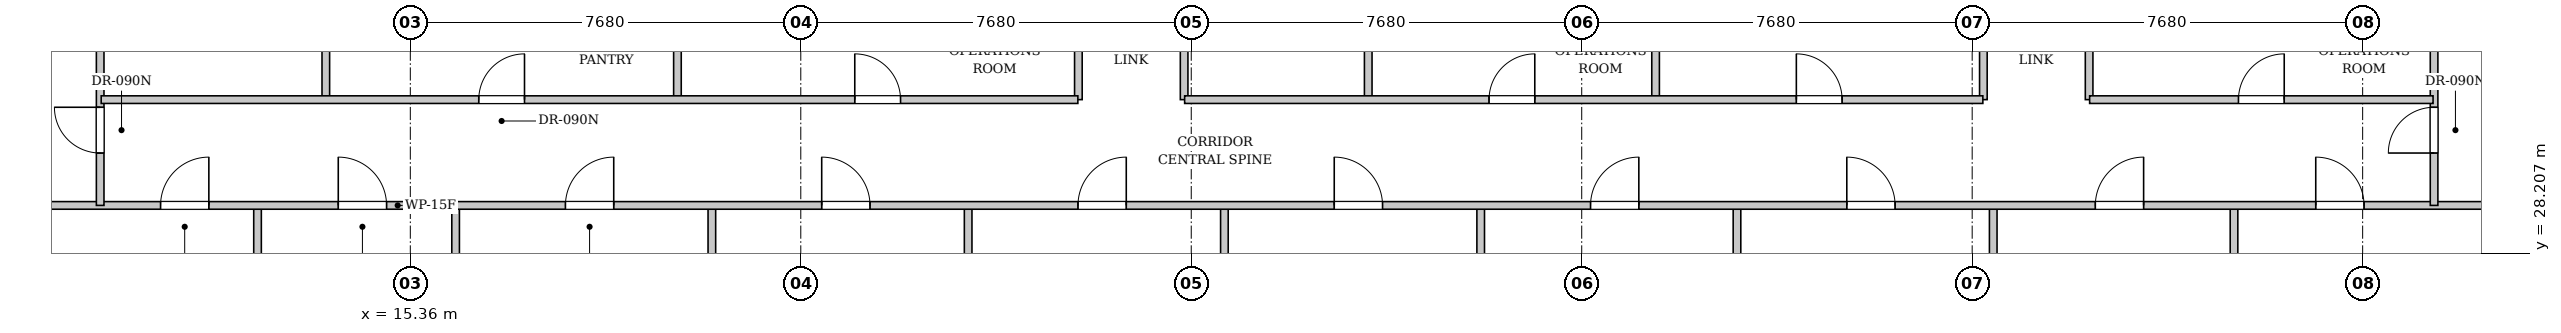
"""IFC4 building model, lengths in metres.
Left out: names, types, materials, properties, quantities, classifications, styles, units other than length and angle.
Written with IfcOpenShell. Run it as: python <this file> out.ifc"""

import sys

from ifc_helpers import new_model, si_unit, direction, frame, frame_2d, origin, place, context, subcontext, project, spatial, rectangle, extrude, element, fill, save


model = new_model("IFC4")
c1 = context("Model", 3, precision=1e-05, world=origin(), true_north=direction((0.0, 1.0)))
c2 = subcontext(c1, "Body", "Model", "MODEL_VIEW")
j1 = project(units=[si_unit("LENGTHUNIT", "METRE"), si_unit("PLANEANGLEUNIT", "RADIAN")], contexts=[c1])
p1 = place(None, origin())
s1 = spatial("IfcSite", under=j1, at=p1, CompositionType="ELEMENT")
p2 = place(p1, origin())
s2 = spatial("IfcBuilding", under=s1, at=p2, CompositionType="ELEMENT")
p3 = place(p2, frame((0.0, 0.0, 178.7)))
s3 = spatial("IfcBuildingStorey", under=s2, at=p3, CompositionType="ELEMENT", Elevation=178.7)
p4 = place(p3, frame((12.355, 12.972, 0.0), z_axis=(0.0, 0.0, 1.0), x_axis=(0.0, 1.0, 0.0)))
e1 = element("IfcWall", 1, at=p4, inside=s3, PredefinedType="PARTITIONING", context=c2, shape_type="SweptSolid", body=[
    extrude(rectangle(XDim=16.198, YDim=0.15, at=frame_2d((8.099, 0.0))), origin(), (0.0, 0.0, 1.0), 3.08),
])
p5 = place(p3, frame((16.251, 12.597, 0.0), z_axis=(0.0, 0.0, 1.0), x_axis=(0.0, 1.0, 0.0)))
e2 = element("IfcWall", 2, at=p5, inside=s3, PredefinedType="PARTITIONING", context=c2, shape_type="SweptSolid", body=[
    extrude(rectangle(XDim=16.573, YDim=0.15, at=frame_2d((8.286, 0.0))), origin(), (0.0, 0.0, 1.0), 3.08),
])
p6 = place(p3, frame((21.291, 12.112, 0.0), z_axis=(0.0, 0.0, 1.0), x_axis=(0.0, 1.0, 0.0)))
e3 = element("IfcWall", 3, at=p6, inside=s3, PredefinedType="PARTITIONING", context=c2, shape_type="SweptSolid", body=[
    extrude(rectangle(XDim=17.058, YDim=0.15, at=frame_2d((8.529, 0.0))), origin(), (0.0, 0.0, 1.0), 3.08),
])
p7 = place(p3, frame((26.332, 11.626, 0.0), z_axis=(0.0, 0.0, 1.0), x_axis=(0.0, 1.0, 0.0)))
e4 = element("IfcWall", 4, at=p7, inside=s3, PredefinedType="PARTITIONING", context=c2, shape_type="SweptSolid", body=[
    extrude(rectangle(XDim=17.543, YDim=0.15, at=frame_2d((8.772, 0.0))), origin(), (0.0, 0.0, 1.0), 3.08),
])
p8 = place(p3, frame((31.372, 11.141, 0.0), z_axis=(0.0, 0.0, 1.0), x_axis=(0.0, 1.0, 0.0)))
e5 = element("IfcWall", 5, at=p8, inside=s3, PredefinedType="PARTITIONING", context=c2, shape_type="SweptSolid", body=[
    extrude(rectangle(XDim=18.029, YDim=0.15, at=frame_2d((9.014, 0.0))), origin(), (0.0, 0.0, 1.0), 2.475),
])
p9 = place(p3, frame((36.413, 10.656, 0.0), z_axis=(0.0, 0.0, 1.0), x_axis=(0.0, 1.0, 0.0)))
e6 = element("IfcWall", 6, at=p9, inside=s3, PredefinedType="PARTITIONING", context=c2, shape_type="SweptSolid", body=[
    extrude(rectangle(XDim=18.514, YDim=0.15, at=frame_2d((9.257, 0.0))), origin(), (0.0, 0.0, 1.0), 3.08),
])
p10 = place(p3, frame((41.454, 10.17, 0.0), z_axis=(0.0, 0.0, 1.0), x_axis=(0.0, 1.0, 0.0)))
e7 = element("IfcWall", 7, at=p10, inside=s3, PredefinedType="PARTITIONING", context=c2, shape_type="SweptSolid", body=[
    extrude(rectangle(XDim=19.0, YDim=0.15, at=frame_2d((9.5, 0.0))), origin(), (0.0, 0.0, 1.0), 3.08),
])
p11 = place(p3, frame((46.494, 9.685, 0.0), z_axis=(0.0, 0.0, 1.0), x_axis=(0.0, 1.0, 0.0)))
e8 = element("IfcWall", 8, at=p11, inside=s3, PredefinedType="PARTITIONING", context=c2, shape_type="SweptSolid", body=[
    extrude(rectangle(XDim=19.485, YDim=0.15, at=frame_2d((9.742, 0.0))), origin(), (0.0, 0.0, 1.0), 2.475),
])
p12 = place(p3, frame((51.23, 9.229, 0.0), z_axis=(0.0, 0.0, 1.0), x_axis=(0.0, 1.0, 0.0)))
e9 = element("IfcWall", 9, at=p12, inside=s3, PredefinedType="PARTITIONING", context=c2, shape_type="SweptSolid", body=[
    extrude(rectangle(XDim=19.941, YDim=0.15, at=frame_2d((9.97, 0.0))), origin(), (0.0, 0.0, 1.0), 3.08),
])
p13 = place(p3, frame((2.46, 29.15, 0.0), z_axis=(0.0, 0.0, 1.0), x_axis=(1.0, 0.0, 0.0)))
e10 = element("IfcWall", 10, at=p13, inside=s3, PredefinedType="PARTITIONING", context=c2, shape_type="SweptSolid", body=[
    extrude(rectangle(XDim=57.505, YDim=0.15, at=frame_2d((28.752, 0.0))), origin(), (0.0, 0.0, 1.0), 2.475),
])
p14 = place(p13, frame((7.987, 0.0, 0.0)))
e11 = element("IfcOpeningElement", 11, at=p14, cuts=e10, PredefinedType="OPENING", context=c2, shape_type="SweptSolid", body=[
    extrude(rectangle(XDim=0.95, YDim=2.15, at=frame_2d((0.475, 1.075))), frame((0.0, 0.085, 0.0), z_axis=(0.0, -1.0, 0.0), x_axis=(1.0, 0.0, 0.0)), (0.0, 0.0, 1.0), 0.17),
])
p15 = place(p13, frame((11.483, 0.0, 0.0)))
e12 = element("IfcOpeningElement", 12, at=p15, cuts=e10, PredefinedType="OPENING", context=c2, shape_type="SweptSolid", body=[
    extrude(rectangle(XDim=0.95, YDim=2.15, at=frame_2d((0.475, 1.075))), frame((0.0, 0.085, 0.0), z_axis=(0.0, -1.0, 0.0), x_axis=(1.0, 0.0, 0.0)), (0.0, 0.0, 1.0), 0.17),
])
p16 = place(p13, frame((15.951, 0.0, 0.0)))
e13 = element("IfcOpeningElement", 13, at=p16, cuts=e10, PredefinedType="OPENING", context=c2, shape_type="SweptSolid", body=[
    extrude(rectangle(XDim=0.95, YDim=2.15, at=frame_2d((0.475, 1.075))), frame((0.0, 0.085, 0.0), z_axis=(0.0, -1.0, 0.0), x_axis=(1.0, 0.0, 0.0)), (0.0, 0.0, 1.0), 0.17),
])
p17 = place(p13, frame((20.991, 0.0, 0.0)))
e14 = element("IfcOpeningElement", 14, at=p17, cuts=e10, PredefinedType="OPENING", context=c2, shape_type="SweptSolid", body=[
    extrude(rectangle(XDim=0.95, YDim=2.15, at=frame_2d((0.475, 1.075))), frame((0.0, 0.085, 0.0), z_axis=(0.0, -1.0, 0.0), x_axis=(1.0, 0.0, 0.0)), (0.0, 0.0, 1.0), 0.17),
])
p18 = place(p13, frame((26.032, 0.0, 0.0)))
e15 = element("IfcOpeningElement", 15, at=p18, cuts=e10, PredefinedType="OPENING", context=c2, shape_type="SweptSolid", body=[
    extrude(rectangle(XDim=0.95, YDim=2.15, at=frame_2d((0.475, 1.075))), frame((0.0, 0.085, 0.0), z_axis=(0.0, -1.0, 0.0), x_axis=(1.0, 0.0, 0.0)), (0.0, 0.0, 1.0), 0.17),
])
p19 = place(p13, frame((31.072, 0.0, 0.0)))
e16 = element("IfcOpeningElement", 16, at=p19, cuts=e10, PredefinedType="OPENING", context=c2, shape_type="SweptSolid", body=[
    extrude(rectangle(XDim=0.95, YDim=2.15, at=frame_2d((0.475, 1.075))), frame((0.0, 0.085, 0.0), z_axis=(0.0, -1.0, 0.0), x_axis=(1.0, 0.0, 0.0)), (0.0, 0.0, 1.0), 0.17),
])
p20 = place(p13, frame((36.113, 0.0, 0.0)))
e17 = element("IfcOpeningElement", 17, at=p20, cuts=e10, PredefinedType="OPENING", context=c2, shape_type="SweptSolid", body=[
    extrude(rectangle(XDim=0.95, YDim=2.15, at=frame_2d((0.475, 1.075))), frame((0.0, 0.085, 0.0), z_axis=(0.0, -1.0, 0.0), x_axis=(1.0, 0.0, 0.0)), (0.0, 0.0, 1.0), 0.17),
])
p21 = place(p13, frame((41.154, 0.0, 0.0)))
e18 = element("IfcOpeningElement", 18, at=p21, cuts=e10, PredefinedType="OPENING", context=c2, shape_type="SweptSolid", body=[
    extrude(rectangle(XDim=0.95, YDim=2.15, at=frame_2d((0.475, 1.075))), frame((0.0, 0.085, 0.0), z_axis=(0.0, -1.0, 0.0), x_axis=(1.0, 0.0, 0.0)), (0.0, 0.0, 1.0), 0.17),
])
p22 = place(p13, frame((46.042, 0.0, 0.0)))
e19 = element("IfcOpeningElement", 19, at=p22, cuts=e10, PredefinedType="OPENING", context=c2, shape_type="SweptSolid", body=[
    extrude(rectangle(XDim=0.95, YDim=2.15, at=frame_2d((0.475, 1.075))), frame((0.0, 0.085, 0.0), z_axis=(0.0, -1.0, 0.0), x_axis=(1.0, 0.0, 0.0)), (0.0, 0.0, 1.0), 0.17),
])
p23 = place(p13, frame((50.377, 0.0, 0.0)))
e20 = element("IfcOpeningElement", 20, at=p23, cuts=e10, PredefinedType="OPENING", context=c2, shape_type="SweptSolid", body=[
    extrude(rectangle(XDim=0.95, YDim=2.15, at=frame_2d((0.475, 1.075))), frame((0.0, 0.085, 0.0), z_axis=(0.0, -1.0, 0.0), x_axis=(1.0, 0.0, 0.0)), (0.0, 0.0, 1.0), 0.17),
])
p24 = place(p3, frame((9.26, 29.15, 0.0), z_axis=(0.0, 0.0, 1.0), x_axis=(0.0, 1.0, 0.0)))
e21 = element("IfcWall", 21, at=p24, inside=s3, PredefinedType="PARTITIONING", context=c2, shape_type="SweptSolid", body=[
    extrude(rectangle(XDim=21.633, YDim=0.15, at=frame_2d((10.817, 0.0))), origin(), (0.0, 0.0, 1.0), 3.08),
])
p25 = place(p24, frame((1.03, 0.0, 0.0)))
e22 = element("IfcOpeningElement", 22, at=p25, cuts=e21, PredefinedType="OPENING", context=c2, shape_type="SweptSolid", body=[
    extrude(rectangle(XDim=0.9, YDim=2.15, at=frame_2d((0.45, 1.075))), frame((0.0, 0.085, 0.0), z_axis=(0.0, -1.0, 0.0), x_axis=(1.0, 0.0, 0.0)), (0.0, 0.0, 1.0), 0.17),
])
p26 = place(p3, frame((55.165, 29.15, 0.0), z_axis=(0.0, 0.0, 1.0), x_axis=(0.0, 1.0, 0.0)))
e23 = element("IfcWall", 23, at=p26, inside=s3, PredefinedType="PARTITIONING", context=c2, shape_type="SweptSolid", body=[
    extrude(rectangle(XDim=17.213, YDim=0.15, at=frame_2d((8.606, 0.0))), origin(), (0.0, 0.0, 1.0), 3.08),
])
p27 = place(p26, frame((1.03, 0.0, 0.0)))
e24 = element("IfcOpeningElement", 24, at=p27, cuts=e23, PredefinedType="OPENING", context=c2, shape_type="SweptSolid", body=[
    extrude(rectangle(XDim=0.9, YDim=2.15, at=frame_2d((0.45, 1.075))), frame((0.0, 0.085, 0.0), z_axis=(0.0, -1.0, 0.0), x_axis=(1.0, 0.0, 0.0)), (0.0, 0.0, 1.0), 0.17),
])
p28 = place(p3, frame((28.5, 31.23, 0.0), z_axis=(0.0, 0.0, 1.0), x_axis=(0.0, 1.0, 0.0)))
e25 = element("IfcWall", 25, at=p28, inside=s3, PredefinedType="PARTITIONING", context=c2, shape_type="SweptSolid", body=[
    extrude(rectangle(XDim=1.82, YDim=0.15, at=frame_2d((0.91, 0.0))), origin(), (0.0, 0.0, 1.0), 3.08),
])
for number, where, z_axis, x_axis in (
    (26, (30.58, 31.23, 0.0), (0.0, 0.0, 1.0), (0.0, 1.0, 0.0)),
    (27, (46.3, 31.23, 0.0), (0.0, 0.0, 1.0), (0.0, 1.0, 0.0)),
):
    element("IfcWall", number, at=place(p3, frame(where, z_axis=z_axis, x_axis=x_axis)), inside=s3, PredefinedType="PARTITIONING", context=c2, shape_type="SweptSolid", body=[
        extrude(rectangle(XDim=1.82, YDim=0.15, at=frame_2d((0.91, 0.0))), origin(), (0.0, 0.0, 1.0), 2.475),
    ])
for number, where, z_axis, x_axis in (
    (28, (48.38, 31.23, 0.0), (0.0, 0.0, 1.0), (0.0, 1.0, 0.0)),
    (29, (13.698, 31.23, 0.0), (0.0, 0.0, 1.0), (0.0, 1.0, 0.0)),
    (30, (20.614, 31.23, 0.0), (0.0, 0.0, 1.0), (0.0, 1.0, 0.0)),
):
    element("IfcWall", number, at=place(p3, frame(where, z_axis=z_axis, x_axis=x_axis)), inside=s3, PredefinedType="PARTITIONING", context=c2, shape_type="SweptSolid", body=[
        extrude(rectangle(XDim=1.82, YDim=0.15, at=frame_2d((0.91, 0.0))), origin(), (0.0, 0.0, 1.0), 3.08),
    ])
p29 = place(p3, frame((9.28, 31.23, 0.0), z_axis=(0.0, 0.0, 1.0), x_axis=(1.0, 0.0, 0.0)))
e31 = element("IfcWall", 31, at=p29, inside=s3, PredefinedType="PARTITIONING", context=c2, shape_type="SweptSolid", body=[
    extrude(rectangle(XDim=19.21, YDim=0.15, at=frame_2d((9.605, 0.0))), origin(), (0.0, 0.0, 1.0), 2.475),
])
p30 = place(p29, frame((7.426, 0.0, 0.0)))
e32 = element("IfcOpeningElement", 32, at=p30, cuts=e31, PredefinedType="OPENING", context=c2, shape_type="SweptSolid", body=[
    extrude(rectangle(XDim=0.9, YDim=2.15, at=frame_2d((0.45, 1.075))), frame((0.0, 0.085, 0.0), z_axis=(0.0, -1.0, 0.0), x_axis=(1.0, 0.0, 0.0)), (0.0, 0.0, 1.0), 0.17),
])
p31 = place(p29, frame((14.822, 0.0, 0.0)))
e33 = element("IfcOpeningElement", 33, at=p31, cuts=e31, PredefinedType="OPENING", context=c2, shape_type="SweptSolid", body=[
    extrude(rectangle(XDim=0.9, YDim=2.15, at=frame_2d((0.45, 1.075))), frame((0.0, 0.085, 0.0), z_axis=(0.0, -1.0, 0.0), x_axis=(1.0, 0.0, 0.0)), (0.0, 0.0, 1.0), 0.17),
])
for number, where, z_axis, x_axis in (
    (34, (34.201, 31.23, 0.0), (0.0, 0.0, 1.0), (0.0, 1.0, 0.0)),
    (35, (39.853, 31.23, 0.0), (0.0, 0.0, 1.0), (0.0, 1.0, 0.0)),
):
    element("IfcWall", number, at=place(p3, frame(where, z_axis=z_axis, x_axis=x_axis)), inside=s3, PredefinedType="PARTITIONING", context=c2, shape_type="SweptSolid", body=[
        extrude(rectangle(XDim=1.82, YDim=0.15, at=frame_2d((0.91, 0.0))), origin(), (0.0, 0.0, 1.0), 3.08),
    ])
p32 = place(p3, frame((30.59, 31.23, 0.0), z_axis=(0.0, 0.0, 1.0), x_axis=(1.0, 0.0, 0.0)))
e36 = element("IfcWall", 36, at=p32, inside=s3, PredefinedType="PARTITIONING", context=c2, shape_type="SweptSolid", body=[
    extrude(rectangle(XDim=15.7, YDim=0.15, at=frame_2d((7.85, 0.0))), origin(), (0.0, 0.0, 1.0), 3.08),
])
p33 = place(p32, frame((5.987, 0.0, 0.0)))
e37 = element("IfcOpeningElement", 37, at=p33, cuts=e36, PredefinedType="OPENING", context=c2, shape_type="SweptSolid", body=[
    extrude(rectangle(XDim=0.9, YDim=2.15, at=frame_2d((0.45, 1.075))), frame((0.0, 0.085, 0.0), z_axis=(0.0, -1.0, 0.0), x_axis=(1.0, 0.0, 0.0)), (0.0, 0.0, 1.0), 0.17),
])
p34 = place(p32, frame((12.031, 0.0, 0.0)))
e38 = element("IfcOpeningElement", 38, at=p34, cuts=e36, PredefinedType="OPENING", context=c2, shape_type="SweptSolid", body=[
    extrude(rectangle(XDim=0.9, YDim=2.15, at=frame_2d((0.45, 1.075))), frame((0.0, 0.085, 0.0), z_axis=(0.0, -1.0, 0.0), x_axis=(1.0, 0.0, 0.0)), (0.0, 0.0, 1.0), 0.17),
])
p35 = place(p3, frame((48.39, 31.23, 0.0), z_axis=(0.0, 0.0, 1.0), x_axis=(1.0, 0.0, 0.0)))
e39 = element("IfcWall", 39, at=p35, inside=s3, PredefinedType="PARTITIONING", context=c2, shape_type="SweptSolid", body=[
    extrude(rectangle(XDim=6.755, YDim=0.15, at=frame_2d((3.377, 0.0))), origin(), (0.0, 0.0, 1.0), 3.08),
])
p36 = place(p35, frame((2.927, 0.0, 0.0)))
e40 = element("IfcOpeningElement", 40, at=p36, cuts=e39, PredefinedType="OPENING", context=c2, shape_type="SweptSolid", body=[
    extrude(rectangle(XDim=0.9, YDim=2.15, at=frame_2d((0.45, 1.075))), frame((0.0, 0.085, 0.0), z_axis=(0.0, -1.0, 0.0), x_axis=(1.0, 0.0, 0.0)), (0.0, 0.0, 1.0), 0.17),
])
p37 = place(p14, origin())
e41 = element("IfcDoor", 41, at=p37, inside=s3, OperationType="SINGLE_SWING_RIGHT", PredefinedType="DOOR", context=c2, shape_type="SweptSolid", body=[
    extrude(rectangle(XDim=0.95, YDim=2.15, at=frame_2d((0.475, 1.075))), frame((0.0, 0.025, 0.0), z_axis=(0.0, -1.0, 0.0), x_axis=(1.0, 0.0, 0.0)), (0.0, 0.0, 1.0), 0.05),
])
fill(e11, e41)
p38 = place(p15, origin())
e42 = element("IfcDoor", 42, at=p38, inside=s3, OperationType="SINGLE_SWING_LEFT", PredefinedType="DOOR", context=c2, shape_type="SweptSolid", body=[
    extrude(rectangle(XDim=0.95, YDim=2.15, at=frame_2d((0.475, 1.075))), frame((0.0, 0.025, 0.0), z_axis=(0.0, -1.0, 0.0), x_axis=(1.0, 0.0, 0.0)), (0.0, 0.0, 1.0), 0.05),
])
fill(e12, e42)
p39 = place(p16, origin())
e43 = element("IfcDoor", 43, at=p39, inside=s3, OperationType="SINGLE_SWING_RIGHT", PredefinedType="DOOR", context=c2, shape_type="SweptSolid", body=[
    extrude(rectangle(XDim=0.95, YDim=2.15, at=frame_2d((0.475, 1.075))), frame((0.0, 0.025, 0.0), z_axis=(0.0, -1.0, 0.0), x_axis=(1.0, 0.0, 0.0)), (0.0, 0.0, 1.0), 0.05),
])
fill(e13, e43)
p40 = place(p17, origin())
e44 = element("IfcDoor", 44, at=p40, inside=s3, OperationType="SINGLE_SWING_LEFT", PredefinedType="DOOR", context=c2, shape_type="SweptSolid", body=[
    extrude(rectangle(XDim=0.95, YDim=2.15, at=frame_2d((0.475, 1.075))), frame((0.0, 0.025, 0.0), z_axis=(0.0, -1.0, 0.0), x_axis=(1.0, 0.0, 0.0)), (0.0, 0.0, 1.0), 0.05),
])
fill(e14, e44)
p41 = place(p18, origin())
e45 = element("IfcDoor", 45, at=p41, inside=s3, OperationType="SINGLE_SWING_RIGHT", PredefinedType="DOOR", context=c2, shape_type="SweptSolid", body=[
    extrude(rectangle(XDim=0.95, YDim=2.15, at=frame_2d((0.475, 1.075))), frame((0.0, 0.025, 0.0), z_axis=(0.0, -1.0, 0.0), x_axis=(1.0, 0.0, 0.0)), (0.0, 0.0, 1.0), 0.05),
])
fill(e15, e45)
p42 = place(p19, origin())
e46 = element("IfcDoor", 46, at=p42, inside=s3, OperationType="SINGLE_SWING_LEFT", PredefinedType="DOOR", context=c2, shape_type="SweptSolid", body=[
    extrude(rectangle(XDim=0.95, YDim=2.15, at=frame_2d((0.475, 1.075))), frame((0.0, 0.025, 0.0), z_axis=(0.0, -1.0, 0.0), x_axis=(1.0, 0.0, 0.0)), (0.0, 0.0, 1.0), 0.05),
])
fill(e16, e46)
p43 = place(p20, origin())
e47 = element("IfcDoor", 47, at=p43, inside=s3, OperationType="SINGLE_SWING_RIGHT", PredefinedType="DOOR", context=c2, shape_type="SweptSolid", body=[
    extrude(rectangle(XDim=0.95, YDim=2.15, at=frame_2d((0.475, 1.075))), frame((0.0, 0.025, 0.0), z_axis=(0.0, -1.0, 0.0), x_axis=(1.0, 0.0, 0.0)), (0.0, 0.0, 1.0), 0.05),
])
fill(e17, e47)
p44 = place(p21, origin())
e48 = element("IfcDoor", 48, at=p44, inside=s3, OperationType="SINGLE_SWING_LEFT", PredefinedType="DOOR", context=c2, shape_type="SweptSolid", body=[
    extrude(rectangle(XDim=0.95, YDim=2.15, at=frame_2d((0.475, 1.075))), frame((0.0, 0.025, 0.0), z_axis=(0.0, -1.0, 0.0), x_axis=(1.0, 0.0, 0.0)), (0.0, 0.0, 1.0), 0.05),
])
fill(e18, e48)
p45 = place(p22, origin())
e49 = element("IfcDoor", 49, at=p45, inside=s3, OperationType="SINGLE_SWING_RIGHT", PredefinedType="DOOR", context=c2, shape_type="SweptSolid", body=[
    extrude(rectangle(XDim=0.95, YDim=2.15, at=frame_2d((0.475, 1.075))), frame((0.0, 0.025, 0.0), z_axis=(0.0, -1.0, 0.0), x_axis=(1.0, 0.0, 0.0)), (0.0, 0.0, 1.0), 0.05),
])
fill(e19, e49)
p46 = place(p23, origin())
e50 = element("IfcDoor", 50, at=p46, inside=s3, OperationType="SINGLE_SWING_LEFT", PredefinedType="DOOR", context=c2, shape_type="SweptSolid", body=[
    extrude(rectangle(XDim=0.95, YDim=2.15, at=frame_2d((0.475, 1.075))), frame((0.0, 0.025, 0.0), z_axis=(0.0, -1.0, 0.0), x_axis=(1.0, 0.0, 0.0)), (0.0, 0.0, 1.0), 0.05),
])
fill(e20, e50)
p47 = place(p25, origin())
e51 = element("IfcDoor", 51, at=p47, inside=s3, OperationType="SINGLE_SWING_RIGHT", PredefinedType="DOOR", context=c2, shape_type="SweptSolid", body=[
    extrude(rectangle(XDim=0.9, YDim=2.15, at=frame_2d((0.45, 1.075))), frame((0.0, 0.025, 0.0), z_axis=(0.0, -1.0, 0.0), x_axis=(1.0, 0.0, 0.0)), (0.0, 0.0, 1.0), 0.05),
])
fill(e22, e51)
p48 = place(p27, origin())
e52 = element("IfcDoor", 52, at=p48, inside=s3, OperationType="SINGLE_SWING_LEFT", PredefinedType="DOOR", context=c2, shape_type="SweptSolid", body=[
    extrude(rectangle(XDim=0.9, YDim=2.15, at=frame_2d((0.45, 1.075))), frame((0.0, 0.025, 0.0), z_axis=(0.0, -1.0, 0.0), x_axis=(1.0, 0.0, 0.0)), (0.0, 0.0, 1.0), 0.05),
])
fill(e24, e52)
p49 = place(p30, origin())
e53 = element("IfcDoor", 53, at=p49, inside=s3, OperationType="SINGLE_SWING_RIGHT", PredefinedType="DOOR", context=c2, shape_type="SweptSolid", body=[
    extrude(rectangle(XDim=0.9, YDim=2.15, at=frame_2d((0.45, 1.075))), frame((0.0, 0.025, 0.0), z_axis=(0.0, -1.0, 0.0), x_axis=(1.0, 0.0, 0.0)), (0.0, 0.0, 1.0), 0.05),
])
fill(e32, e53)
p50 = place(p31, origin())
e54 = element("IfcDoor", 54, at=p50, inside=s3, OperationType="SINGLE_SWING_LEFT", PredefinedType="DOOR", context=c2, shape_type="SweptSolid", body=[
    extrude(rectangle(XDim=0.9, YDim=2.15, at=frame_2d((0.45, 1.075))), frame((0.0, 0.025, 0.0), z_axis=(0.0, -1.0, 0.0), x_axis=(1.0, 0.0, 0.0)), (0.0, 0.0, 1.0), 0.05),
])
fill(e33, e54)
p51 = place(p33, origin())
e55 = element("IfcDoor", 55, at=p51, inside=s3, OperationType="SINGLE_SWING_RIGHT", PredefinedType="DOOR", context=c2, shape_type="SweptSolid", body=[
    extrude(rectangle(XDim=0.9, YDim=2.15, at=frame_2d((0.45, 1.075))), frame((0.0, 0.025, 0.0), z_axis=(0.0, -1.0, 0.0), x_axis=(1.0, 0.0, 0.0)), (0.0, 0.0, 1.0), 0.05),
])
fill(e37, e55)
p52 = place(p34, origin())
e56 = element("IfcDoor", 56, at=p52, inside=s3, OperationType="SINGLE_SWING_LEFT", PredefinedType="DOOR", context=c2, shape_type="SweptSolid", body=[
    extrude(rectangle(XDim=0.9, YDim=2.15, at=frame_2d((0.45, 1.075))), frame((0.0, 0.025, 0.0), z_axis=(0.0, -1.0, 0.0), x_axis=(1.0, 0.0, 0.0)), (0.0, 0.0, 1.0), 0.05),
])
fill(e38, e56)
p53 = place(p36, origin())
e57 = element("IfcDoor", 57, at=p53, inside=s3, OperationType="SINGLE_SWING_RIGHT", PredefinedType="DOOR", context=c2, shape_type="SweptSolid", body=[
    extrude(rectangle(XDim=0.9, YDim=2.15, at=frame_2d((0.45, 1.075))), frame((0.0, 0.025, 0.0), z_axis=(0.0, -1.0, 0.0), x_axis=(1.0, 0.0, 0.0)), (0.0, 0.0, 1.0), 0.05),
])
fill(e40, e57)
save(model, sys.argv[1])
